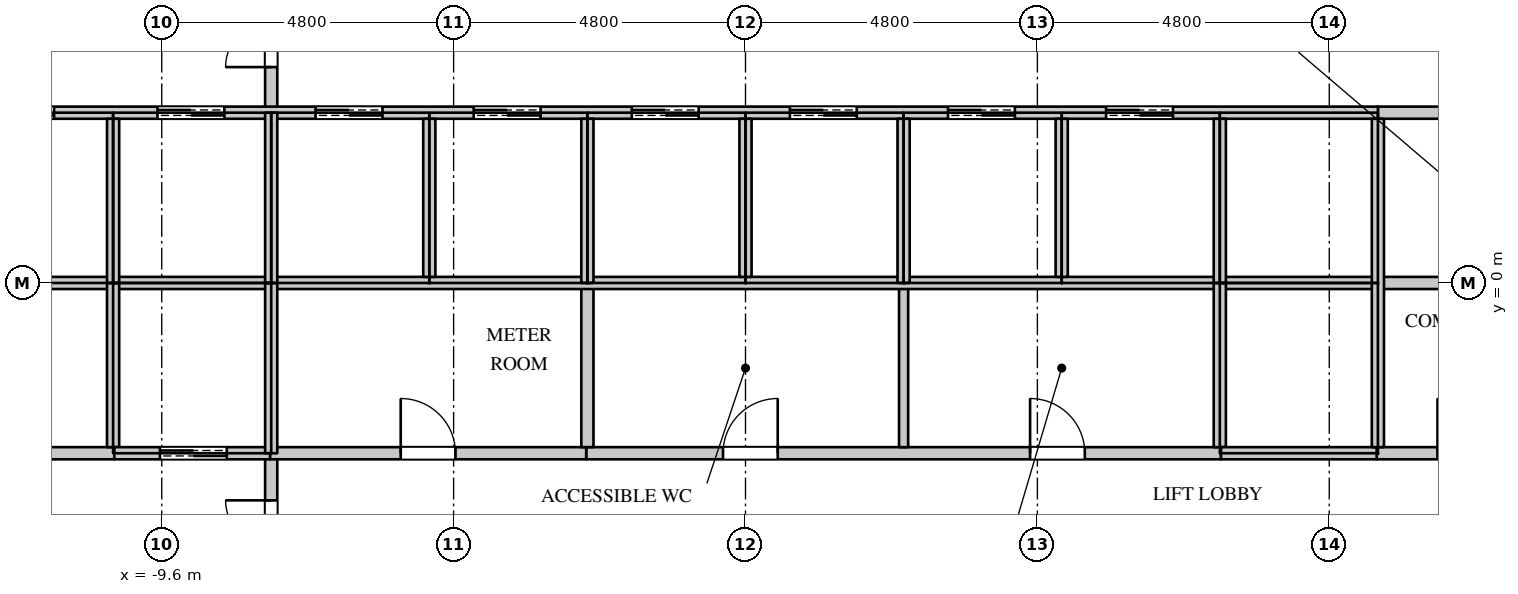
"""IFC4 building model, lengths in metres.
Left out: names, types, materials, properties, quantities, classifications, styles, units other than length and angle.
Written with IfcOpenShell. Run it as: python <this file> out.ifc"""

import sys

from ifc_helpers import new_model, si_unit, direction, frame, frame_2d, origin, place, context, subcontext, project, spatial, rectangle, extrude, element, fill, save


model = new_model("IFC4")
c1 = context("Model", 3, precision=1e-05, world=origin(), true_north=direction((0.0, 1.0)))
c2 = subcontext(c1, "Body", "Model", "MODEL_VIEW")
j1 = project(units=[si_unit("LENGTHUNIT", "METRE"), si_unit("PLANEANGLEUNIT", "RADIAN")], contexts=[c1])
p1 = place(None, origin())
s1 = spatial("IfcSite", under=j1, at=p1, CompositionType="ELEMENT")
p2 = place(p1, origin())
s2 = spatial("IfcBuilding", under=s1, at=p2, CompositionType="ELEMENT")
p3 = place(p2, frame((0.0, 0.0, 96.9)))
s3 = spatial("IfcBuildingStorey", under=s2, at=p3, CompositionType="ELEMENT", Elevation=96.9)
p4 = place(p3, frame((-7.8, -8.075, 0.0), z_axis=(0.0, 0.0, 1.0), x_axis=(0.0, 1.0, 0.0)))
e1 = element("IfcWall", 1, at=p4, inside=s3, PredefinedType="PARTITIONING", context=c2, shape_type="SweptSolid", body=[
    extrude(rectangle(XDim=5.275, YDim=0.2, at=frame_2d((2.637, 0.0))), origin(), (0.0, 0.0, 1.0), 3.798),
])
p5 = place(p4, frame((3.0, 0.0, 0.0)))
e2 = element("IfcOpeningElement", 2, at=p5, cuts=e1, PredefinedType="OPENING", context=c2, shape_type="SweptSolid", body=[
    extrude(rectangle(XDim=1.5, YDim=2.4, at=frame_2d((0.75, 1.2))), frame((0.0, 0.11, 0.0), z_axis=(0.0, -1.0, 0.0), x_axis=(1.0, 0.0, 0.0)), (0.0, 0.0, 1.0), 0.22),
])
p6 = place(p3, frame((-7.8, 2.8, 0.0), z_axis=(0.0, 0.0, 1.0), x_axis=(0.0, 1.0, 0.0)))
e3 = element("IfcWall", 3, at=p6, inside=s3, PredefinedType="PARTITIONING", context=c2, shape_type="SweptSolid", body=[
    extrude(rectangle(XDim=5.275, YDim=0.2, at=frame_2d((2.637, 0.0))), origin(), (0.0, 0.0, 1.0), 3.798),
])
p7 = place(p6, frame((0.75, 0.0, 0.0)))
e4 = element("IfcOpeningElement", 4, at=p7, cuts=e3, PredefinedType="OPENING", context=c2, shape_type="SweptSolid", body=[
    extrude(rectangle(XDim=1.5, YDim=2.4, at=frame_2d((0.75, 1.2))), frame((0.0, 0.11, 0.0), z_axis=(0.0, -1.0, 0.0), x_axis=(1.0, 0.0, 0.0)), (0.0, 0.0, 1.0), 0.22),
])
p8 = place(p3, frame((-2.62, -2.8, 0.0), z_axis=(0.0, 0.0, 1.0), x_axis=(1.0, 0.0, 0.0)))
e5 = element("IfcWall", 5, at=p8, inside=s3, PredefinedType="PARTITIONING", context=c2, shape_type="SweptSolid", body=[
    extrude(rectangle(XDim=10.44, YDim=0.2, at=frame_2d((5.22, 0.0))), origin(), (0.0, 0.0, 1.0), 3.798),
])
p9 = place(p8, frame((2.25, 0.0, 0.0)))
e6 = element("IfcOpeningElement", 6, at=p9, cuts=e5, PredefinedType="OPENING", context=c2, shape_type="SweptSolid", body=[
    extrude(rectangle(XDim=0.9, YDim=2.2, at=frame_2d((0.45, 1.1))), frame((0.0, 0.11, 0.0), z_axis=(0.0, -1.0, 0.0), x_axis=(1.0, 0.0, 0.0)), (0.0, 0.0, 1.0), 0.22),
])
p10 = place(p8, frame((7.3, 0.0, 0.0)))
e7 = element("IfcOpeningElement", 7, at=p10, cuts=e5, PredefinedType="OPENING", context=c2, shape_type="SweptSolid", body=[
    extrude(rectangle(XDim=0.9, YDim=2.2, at=frame_2d((0.45, 1.1))), frame((0.0, 0.11, 0.0), z_axis=(0.0, -1.0, 0.0), x_axis=(1.0, 0.0, 0.0)), (0.0, 0.0, 1.0), 0.22),
])
p11 = place(p3, frame((2.6, -2.7, 0.0), z_axis=(0.0, 0.0, 1.0), x_axis=(0.0, 1.0, 0.0)))
e8 = element("IfcWall", 8, at=p11, inside=s3, PredefinedType="PARTITIONING", context=c2, shape_type="SweptSolid", body=[
    extrude(rectangle(XDim=2.7, YDim=0.15, at=frame_2d((1.35, 0.0))), origin(), (0.0, 0.0, 1.0), 3.798),
])
p12 = place(p3, frame((-13.37, -2.8, 0.0), z_axis=(0.0, 0.0, 1.0), x_axis=(1.0, 0.0, 0.0)))
e9 = element("IfcWall", 9, at=p12, inside=s3, PredefinedType="PARTITIONING", context=c2, shape_type="SweptSolid", body=[
    extrude(rectangle(XDim=2.99, YDim=0.2, at=frame_2d((1.495, 0.0))), origin(), (0.0, 0.0, 1.0), 3.798),
])
p13 = place(p12, frame((1.2, 0.0, 0.0)))
e10 = element("IfcOpeningElement", 10, at=p13, cuts=e9, PredefinedType="OPENING", context=c2, shape_type="SweptSolid", body=[
    extrude(rectangle(XDim=0.6, YDim=2.0, at=frame_2d((0.3, 1.0))), frame((0.0, 0.11, 0.0), z_axis=(0.0, -1.0, 0.0), x_axis=(1.0, 0.0, 0.0)), (0.0, 0.0, 1.0), 0.22),
])
p14 = place(p3, frame((-7.82, -2.8, 0.0), z_axis=(0.0, 0.0, 1.0), x_axis=(1.0, 0.0, 0.0)))
e11 = element("IfcWall", 11, at=p14, inside=s3, PredefinedType="PARTITIONING", context=c2, shape_type="SweptSolid", body=[
    extrude(rectangle(XDim=5.2, YDim=0.2, at=frame_2d((2.6, 0.0))), origin(), (0.0, 0.0, 1.0), 3.798),
])
p15 = place(p14, frame((2.15, 0.0, 0.0)))
e12 = element("IfcOpeningElement", 12, at=p15, cuts=e11, PredefinedType="OPENING", context=c2, shape_type="SweptSolid", body=[
    extrude(rectangle(XDim=0.9, YDim=2.2, at=frame_2d((0.45, 1.1))), frame((0.0, 0.11, 0.0), z_axis=(0.0, -1.0, 0.0), x_axis=(1.0, 0.0, 0.0)), (0.0, 0.0, 1.0), 0.22),
])
p16 = place(p3, frame((-2.6, -2.7, 0.0), z_axis=(0.0, 0.0, 1.0), x_axis=(0.0, 1.0, 0.0)))
e13 = element("IfcWall", 13, at=p16, inside=s3, PredefinedType="PARTITIONING", context=c2, shape_type="SweptSolid", body=[
    extrude(rectangle(XDim=2.7, YDim=0.2, at=frame_2d((1.35, 0.0))), origin(), (0.0, 0.0, 1.0), 3.798),
])
p17 = place(p3, frame((10.38, -2.8, 0.0), z_axis=(0.0, 0.0, 1.0), x_axis=(1.0, 0.0, 0.0)))
e14 = element("IfcWall", 14, at=p17, inside=s3, PredefinedType="PARTITIONING", context=c2, shape_type="SweptSolid", body=[
    extrude(rectangle(XDim=2.99, YDim=0.2, at=frame_2d((1.495, 0.0))), origin(), (0.0, 0.0, 1.0), 3.798),
])
p18 = place(p17, frame((1.0, 0.0, 0.0)))
e15 = element("IfcOpeningElement", 15, at=p18, cuts=e14, PredefinedType="OPENING", context=c2, shape_type="SweptSolid", body=[
    extrude(rectangle(XDim=0.9, YDim=2.2, at=frame_2d((0.45, 1.1))), frame((0.0, 0.11, 0.0), z_axis=(0.0, -1.0, 0.0), x_axis=(1.0, 0.0, 0.0)), (0.0, 0.0, 1.0), 0.22),
])
p19 = place(p3, frame((10.4, 2.8, 0.0), z_axis=(0.0, 0.0, 1.0), x_axis=(1.0, 0.0, 0.0)))
e16 = element("IfcWall", 16, at=p19, inside=s3, PredefinedType="PARTITIONING", context=c2, shape_type="SweptSolid", body=[
    extrude(rectangle(XDim=2.97, YDim=0.2, at=frame_2d((1.485, 0.0))), origin(), (0.0, 0.0, 1.0), 3.798),
])
p20 = place(p19, frame((1.2, 0.0, 0.0)))
e17 = element("IfcOpeningElement", 17, at=p20, cuts=e16, PredefinedType="OPENING", context=c2, shape_type="SweptSolid", body=[
    extrude(rectangle(XDim=0.6, YDim=2.0, at=frame_2d((0.3, 1.0))), frame((0.0, 0.11, 0.0), z_axis=(0.0, -1.0, 0.0), x_axis=(1.0, 0.0, 0.0)), (0.0, 0.0, 1.0), 0.22),
])
p21 = place(p3, frame((10.4, 0.0, 0.0), z_axis=(0.0, 0.0, 1.0), x_axis=(1.0, 0.0, 0.0)))
e18 = element("IfcWall", 18, at=p21, inside=s3, PredefinedType="PARTITIONING", context=c2, shape_type="SweptSolid", body=[
    extrude(rectangle(XDim=2.97, YDim=0.2, at=frame_2d((1.485, 0.0))), origin(), (0.0, 0.0, 1.0), 3.798),
])
p22 = place(p3, frame((-13.37, 0.0, 0.0), z_axis=(0.0, 0.0, 1.0), x_axis=(1.0, 0.0, 0.0)))
e19 = element("IfcWall", 19, at=p22, inside=s3, PredefinedType="PARTITIONING", context=c2, shape_type="SweptSolid", body=[
    extrude(rectangle(XDim=23.77, YDim=0.2, at=frame_2d((11.885, 0.0))), origin(), (0.0, 0.0, 1.0), 3.798),
])
p23 = place(p3, frame((-13.37, 2.8, 0.0), z_axis=(0.0, 0.0, 1.0), x_axis=(1.0, 0.0, 0.0)))
e20 = element("IfcWall", 20, at=p23, inside=s3, PredefinedType="PARTITIONING", context=c2, shape_type="SweptSolid", body=[
    extrude(rectangle(XDim=23.77, YDim=0.2, at=frame_2d((11.885, 0.0))), origin(), (0.0, 0.0, 1.0), 3.798),
])
p24 = place(p23, frame((0.9, 0.0, 0.0)))
e21 = element("IfcOpeningElement", 21, at=p24, cuts=e20, PredefinedType="OPENING", context=c2, shape_type="SweptSolid", body=[
    extrude(rectangle(XDim=1.1, YDim=2.2, at=frame_2d((0.55, 1.1))), frame((0.0, 0.11, 0.0), z_axis=(0.0, -1.0, 0.0), x_axis=(1.0, 0.0, 0.0)), (0.0, 0.0, 1.0), 0.22),
])
p25 = place(p23, frame((3.7, 0.0, 0.0)))
e22 = element("IfcOpeningElement", 22, at=p25, cuts=e20, PredefinedType="OPENING", context=c2, shape_type="SweptSolid", body=[
    extrude(rectangle(XDim=1.1, YDim=2.2, at=frame_2d((0.55, 1.1))), frame((0.0, 0.11, 0.0), z_axis=(0.0, -1.0, 0.0), x_axis=(1.0, 0.0, 0.0)), (0.0, 0.0, 1.0), 0.22),
])
p26 = place(p23, frame((6.3, 0.0, 0.0)))
e23 = element("IfcOpeningElement", 23, at=p26, cuts=e20, PredefinedType="OPENING", context=c2, shape_type="SweptSolid", body=[
    extrude(rectangle(XDim=1.1, YDim=2.2, at=frame_2d((0.55, 1.1))), frame((0.0, 0.11, 0.0), z_axis=(0.0, -1.0, 0.0), x_axis=(1.0, 0.0, 0.0)), (0.0, 0.0, 1.0), 0.22),
])
p27 = place(p23, frame((8.9, 0.0, 0.0)))
e24 = element("IfcOpeningElement", 24, at=p27, cuts=e20, PredefinedType="OPENING", context=c2, shape_type="SweptSolid", body=[
    extrude(rectangle(XDim=1.1, YDim=2.2, at=frame_2d((0.55, 1.1))), frame((0.0, 0.11, 0.0), z_axis=(0.0, -1.0, 0.0), x_axis=(1.0, 0.0, 0.0)), (0.0, 0.0, 1.0), 0.22),
])
p28 = place(p23, frame((11.5, 0.0, 0.0)))
e25 = element("IfcOpeningElement", 25, at=p28, cuts=e20, PredefinedType="OPENING", context=c2, shape_type="SweptSolid", body=[
    extrude(rectangle(XDim=1.1, YDim=2.2, at=frame_2d((0.55, 1.1))), frame((0.0, 0.11, 0.0), z_axis=(0.0, -1.0, 0.0), x_axis=(1.0, 0.0, 0.0)), (0.0, 0.0, 1.0), 0.22),
])
p29 = place(p23, frame((14.1, 0.0, 0.0)))
e26 = element("IfcOpeningElement", 26, at=p29, cuts=e20, PredefinedType="OPENING", context=c2, shape_type="SweptSolid", body=[
    extrude(rectangle(XDim=1.1, YDim=2.2, at=frame_2d((0.55, 1.1))), frame((0.0, 0.11, 0.0), z_axis=(0.0, -1.0, 0.0), x_axis=(1.0, 0.0, 0.0)), (0.0, 0.0, 1.0), 0.22),
])
p30 = place(p23, frame((16.7, 0.0, 0.0)))
e27 = element("IfcOpeningElement", 27, at=p30, cuts=e20, PredefinedType="OPENING", context=c2, shape_type="SweptSolid", body=[
    extrude(rectangle(XDim=1.1, YDim=2.2, at=frame_2d((0.55, 1.1))), frame((0.0, 0.11, 0.0), z_axis=(0.0, -1.0, 0.0), x_axis=(1.0, 0.0, 0.0)), (0.0, 0.0, 1.0), 0.22),
])
p31 = place(p23, frame((19.3, 0.0, 0.0)))
e28 = element("IfcOpeningElement", 28, at=p31, cuts=e20, PredefinedType="OPENING", context=c2, shape_type="SweptSolid", body=[
    extrude(rectangle(XDim=1.1, YDim=2.2, at=frame_2d((0.55, 1.1))), frame((0.0, 0.11, 0.0), z_axis=(0.0, -1.0, 0.0), x_axis=(1.0, 0.0, 0.0)), (0.0, 0.0, 1.0), 0.22),
])
p32 = place(p3, frame((-10.4, -2.7, 0.0), z_axis=(0.0, 0.0, 1.0), x_axis=(0.0, 1.0, 0.0)))
e29 = element("IfcWall", 29, at=p32, inside=s3, PredefinedType="PARTITIONING", context=c2, shape_type="SweptSolid", body=[
    extrude(rectangle(XDim=2.7, YDim=0.2, at=frame_2d((1.35, 0.0))), origin(), (0.0, 0.0, 1.0), 3.798),
])
p33 = place(p3, frame((-10.38, -2.8, 0.0), z_axis=(0.0, 0.0, 1.0), x_axis=(1.0, 0.0, 0.0)))
e30 = element("IfcWall", 30, at=p33, inside=s3, PredefinedType="PARTITIONING", context=c2, shape_type="SweptSolid", body=[
    extrude(rectangle(XDim=2.56, YDim=0.2, at=frame_2d((1.28, 0.0))), origin(), (0.0, 0.0, 1.0), 3.798),
])
p34 = place(p33, frame((0.75, 0.0, 0.0)))
e31 = element("IfcOpeningElement", 31, at=p34, cuts=e30, PredefinedType="OPENING", context=c2, shape_type="SweptSolid", body=[
    extrude(rectangle(XDim=1.1, YDim=2.2, at=frame_2d((0.55, 1.1))), frame((0.0, 0.11, 0.0), z_axis=(0.0, -1.0, 0.0), x_axis=(1.0, 0.0, 0.0)), (0.0, 0.0, 1.0), 0.22),
])
p35 = place(p3, frame((-10.4, 0.0, 0.0), z_axis=(0.0, 0.0, 1.0), x_axis=(0.0, 1.0, 0.0)))
e32 = element("IfcWall", 32, at=p35, inside=s3, PredefinedType="PARTITIONING", context=c2, shape_type="SweptSolid", body=[
    extrude(rectangle(XDim=2.7, YDim=0.2, at=frame_2d((1.35, 0.0))), origin(), (0.0, 0.0, 1.0), 3.798),
])
for number, where, z_axis, x_axis in (
    (33, (-7.8, -2.8, 0.0), (0.0, 0.0, 1.0), (0.0, 1.0, 0.0)),
    (34, (-7.8, 0.0, 0.0), (0.0, 0.0, 1.0), (0.0, 1.0, 0.0)),
):
    element("IfcWall", number, at=place(p3, frame(where, z_axis=z_axis, x_axis=x_axis)), inside=s3, PredefinedType="PARTITIONING", context=c2, shape_type="SweptSolid", body=[
        extrude(rectangle(XDim=2.8, YDim=0.2, at=frame_2d((1.4, 0.0))), origin(), (0.0, 0.0, 1.0), 3.798),
    ])
p36 = place(p3, frame((-5.2, 0.1, 0.0), z_axis=(0.0, 0.0, 1.0), x_axis=(0.0, 1.0, 0.0)))
e35 = element("IfcWall", 35, at=p36, inside=s3, PredefinedType="PARTITIONING", context=c2, shape_type="SweptSolid", body=[
    extrude(rectangle(XDim=2.6, YDim=0.2, at=frame_2d((1.3, 0.0))), origin(), (0.0, 0.0, 1.0), 3.798),
])
p37 = place(p3, frame((-2.6, 0.0, 0.0), z_axis=(0.0, 0.0, 1.0), x_axis=(0.0, 1.0, 0.0)))
e36 = element("IfcWall", 36, at=p37, inside=s3, PredefinedType="PARTITIONING", context=c2, shape_type="SweptSolid", body=[
    extrude(rectangle(XDim=2.7, YDim=0.2, at=frame_2d((1.35, 0.0))), origin(), (0.0, 0.0, 1.0), 3.798),
])
p38 = place(p3, frame((0.0, 0.1, 0.0), z_axis=(0.0, 0.0, 1.0), x_axis=(0.0, 1.0, 0.0)))
e37 = element("IfcWall", 37, at=p38, inside=s3, PredefinedType="PARTITIONING", context=c2, shape_type="SweptSolid", body=[
    extrude(rectangle(XDim=2.6, YDim=0.2, at=frame_2d((1.3, 0.0))), origin(), (0.0, 0.0, 1.0), 3.798),
])
p39 = place(p3, frame((2.6, 0.0, 0.0), z_axis=(0.0, 0.0, 1.0), x_axis=(0.0, 1.0, 0.0)))
e38 = element("IfcWall", 38, at=p39, inside=s3, PredefinedType="PARTITIONING", context=c2, shape_type="SweptSolid", body=[
    extrude(rectangle(XDim=2.7, YDim=0.2, at=frame_2d((1.35, 0.0))), origin(), (0.0, 0.0, 1.0), 3.798),
])
p40 = place(p3, frame((5.2, 0.1, 0.0), z_axis=(0.0, 0.0, 1.0), x_axis=(0.0, 1.0, 0.0)))
e39 = element("IfcWall", 39, at=p40, inside=s3, PredefinedType="PARTITIONING", context=c2, shape_type="SweptSolid", body=[
    extrude(rectangle(XDim=2.6, YDim=0.2, at=frame_2d((1.3, 0.0))), origin(), (0.0, 0.0, 1.0), 3.798),
])
p41 = place(p3, frame((7.8, -2.7, 0.0), z_axis=(0.0, 0.0, 1.0), x_axis=(0.0, 1.0, 0.0)))
e40 = element("IfcWall", 40, at=p41, inside=s3, PredefinedType="PARTITIONING", context=c2, shape_type="SweptSolid", body=[
    extrude(rectangle(XDim=2.7, YDim=0.2, at=frame_2d((1.35, 0.0))), origin(), (0.0, 0.0, 1.0), 3.798),
])
p42 = place(p3, frame((7.82, -2.8, 0.0), z_axis=(0.0, 0.0, 1.0), x_axis=(1.0, 0.0, 0.0)))
e41 = element("IfcWall", 41, at=p42, inside=s3, PredefinedType="PARTITIONING", context=c2, shape_type="SweptSolid", body=[
    extrude(rectangle(XDim=2.56, YDim=0.2, at=frame_2d((1.28, 0.0))), origin(), (0.0, 0.0, 1.0), 3.798),
])
p43 = place(p3, frame((7.8, 0.0, 0.0), z_axis=(0.0, 0.0, 1.0), x_axis=(0.0, 1.0, 0.0)))
e42 = element("IfcWall", 42, at=p43, inside=s3, PredefinedType="PARTITIONING", context=c2, shape_type="SweptSolid", body=[
    extrude(rectangle(XDim=2.7, YDim=0.2, at=frame_2d((1.35, 0.0))), origin(), (0.0, 0.0, 1.0), 3.798),
])
p44 = place(p3, frame((10.4, -2.7, 0.0), z_axis=(0.0, 0.0, 1.0), x_axis=(0.0, 1.0, 0.0)))
e43 = element("IfcWall", 43, at=p44, inside=s3, PredefinedType="PARTITIONING", context=c2, shape_type="SweptSolid", body=[
    extrude(rectangle(XDim=5.4, YDim=0.2, at=frame_2d((2.7, 0.0))), origin(), (0.0, 0.0, 1.0), 3.798),
])
p45 = place(p18, origin())
e44 = element("IfcDoor", 44, at=p45, inside=s3, OperationType="SINGLE_SWING_LEFT", PredefinedType="DOOR", context=c2, shape_type="SweptSolid", body=[
    extrude(rectangle(XDim=0.9, YDim=2.2, at=frame_2d((0.45, 1.1))), frame((0.0, 0.025, 0.0), z_axis=(0.0, -1.0, 0.0), x_axis=(1.0, 0.0, 0.0)), (0.0, 0.0, 1.0), 0.05),
])
fill(e15, e44)
p46 = place(p15, origin())
e45 = element("IfcDoor", 45, at=p46, inside=s3, OperationType="SINGLE_SWING_LEFT", PredefinedType="DOOR", context=c2, shape_type="SweptSolid", body=[
    extrude(rectangle(XDim=0.9, YDim=2.2, at=frame_2d((0.45, 1.1))), frame((0.0, 0.025, 0.0), z_axis=(0.0, -1.0, 0.0), x_axis=(1.0, 0.0, 0.0)), (0.0, 0.0, 1.0), 0.05),
])
fill(e12, e45)
p47 = place(p9, origin())
e46 = element("IfcDoor", 46, at=p47, inside=s3, OperationType="SINGLE_SWING_RIGHT", PredefinedType="DOOR", context=c2, shape_type="SweptSolid", body=[
    extrude(rectangle(XDim=0.9, YDim=2.2, at=frame_2d((0.45, 1.1))), frame((0.0, 0.025, 0.0), z_axis=(0.0, -1.0, 0.0), x_axis=(1.0, 0.0, 0.0)), (0.0, 0.0, 1.0), 0.05),
])
fill(e6, e46)
p48 = place(p10, origin())
e47 = element("IfcDoor", 47, at=p48, inside=s3, OperationType="SINGLE_SWING_LEFT", PredefinedType="DOOR", context=c2, shape_type="SweptSolid", body=[
    extrude(rectangle(XDim=0.9, YDim=2.2, at=frame_2d((0.45, 1.1))), frame((0.0, 0.025, 0.0), z_axis=(0.0, -1.0, 0.0), x_axis=(1.0, 0.0, 0.0)), (0.0, 0.0, 1.0), 0.05),
])
fill(e7, e47)
p49 = place(p24, origin())
e48 = element("IfcDoor", 48, at=p49, inside=s3, OperationType="DOUBLE_DOOR_SLIDING", PredefinedType="DOOR", context=c2, shape_type="SweptSolid", body=[
    extrude(rectangle(XDim=1.1, YDim=2.2, at=frame_2d((0.55, 1.1))), frame((0.0, 0.025, 0.0), z_axis=(0.0, -1.0, 0.0), x_axis=(1.0, 0.0, 0.0)), (0.0, 0.0, 1.0), 0.05),
])
fill(e21, e48)
p50 = place(p25, origin())
e49 = element("IfcDoor", 49, at=p50, inside=s3, OperationType="DOUBLE_DOOR_SLIDING", PredefinedType="DOOR", context=c2, shape_type="SweptSolid", body=[
    extrude(rectangle(XDim=1.1, YDim=2.2, at=frame_2d((0.55, 1.1))), frame((0.0, 0.025, 0.0), z_axis=(0.0, -1.0, 0.0), x_axis=(1.0, 0.0, 0.0)), (0.0, 0.0, 1.0), 0.05),
])
fill(e22, e49)
p51 = place(p34, origin())
e50 = element("IfcDoor", 50, at=p51, inside=s3, OperationType="DOUBLE_DOOR_SLIDING", PredefinedType="DOOR", context=c2, shape_type="SweptSolid", body=[
    extrude(rectangle(XDim=1.1, YDim=2.2, at=frame_2d((0.55, 1.1))), frame((0.0, 0.025, 0.0), z_axis=(0.0, -1.0, 0.0), x_axis=(1.0, 0.0, 0.0)), (0.0, 0.0, 1.0), 0.05),
])
fill(e31, e50)
p52 = place(p26, origin())
e51 = element("IfcDoor", 51, at=p52, inside=s3, OperationType="DOUBLE_DOOR_SLIDING", PredefinedType="DOOR", context=c2, shape_type="SweptSolid", body=[
    extrude(rectangle(XDim=1.1, YDim=2.2, at=frame_2d((0.55, 1.1))), frame((0.0, 0.025, 0.0), z_axis=(0.0, -1.0, 0.0), x_axis=(1.0, 0.0, 0.0)), (0.0, 0.0, 1.0), 0.05),
])
fill(e23, e51)
p53 = place(p27, origin())
e52 = element("IfcDoor", 52, at=p53, inside=s3, OperationType="DOUBLE_DOOR_SLIDING", PredefinedType="DOOR", context=c2, shape_type="SweptSolid", body=[
    extrude(rectangle(XDim=1.1, YDim=2.2, at=frame_2d((0.55, 1.1))), frame((0.0, 0.025, 0.0), z_axis=(0.0, -1.0, 0.0), x_axis=(1.0, 0.0, 0.0)), (0.0, 0.0, 1.0), 0.05),
])
fill(e24, e52)
p54 = place(p28, origin())
e53 = element("IfcDoor", 53, at=p54, inside=s3, OperationType="DOUBLE_DOOR_SLIDING", PredefinedType="DOOR", context=c2, shape_type="SweptSolid", body=[
    extrude(rectangle(XDim=1.1, YDim=2.2, at=frame_2d((0.55, 1.1))), frame((0.0, 0.025, 0.0), z_axis=(0.0, -1.0, 0.0), x_axis=(1.0, 0.0, 0.0)), (0.0, 0.0, 1.0), 0.05),
])
fill(e25, e53)
p55 = place(p29, origin())
e54 = element("IfcDoor", 54, at=p55, inside=s3, OperationType="DOUBLE_DOOR_SLIDING", PredefinedType="DOOR", context=c2, shape_type="SweptSolid", body=[
    extrude(rectangle(XDim=1.1, YDim=2.2, at=frame_2d((0.55, 1.1))), frame((0.0, 0.025, 0.0), z_axis=(0.0, -1.0, 0.0), x_axis=(1.0, 0.0, 0.0)), (0.0, 0.0, 1.0), 0.05),
])
fill(e26, e54)
p56 = place(p30, origin())
e55 = element("IfcDoor", 55, at=p56, inside=s3, OperationType="DOUBLE_DOOR_SLIDING", PredefinedType="DOOR", context=c2, shape_type="SweptSolid", body=[
    extrude(rectangle(XDim=1.1, YDim=2.2, at=frame_2d((0.55, 1.1))), frame((0.0, 0.025, 0.0), z_axis=(0.0, -1.0, 0.0), x_axis=(1.0, 0.0, 0.0)), (0.0, 0.0, 1.0), 0.05),
])
fill(e27, e55)
p57 = place(p31, origin())
e56 = element("IfcDoor", 56, at=p57, inside=s3, OperationType="DOUBLE_DOOR_SLIDING", PredefinedType="DOOR", context=c2, shape_type="SweptSolid", body=[
    extrude(rectangle(XDim=1.1, YDim=2.2, at=frame_2d((0.55, 1.1))), frame((0.0, 0.025, 0.0), z_axis=(0.0, -1.0, 0.0), x_axis=(1.0, 0.0, 0.0)), (0.0, 0.0, 1.0), 0.05),
])
fill(e28, e56)
p58 = place(p7, origin())
e57 = element("IfcDoor", 57, at=p58, inside=s3, OperationType="DOUBLE_DOOR_SINGLE_SWING", PredefinedType="DOOR", context=c2, shape_type="SweptSolid", body=[
    extrude(rectangle(XDim=1.5, YDim=2.4, at=frame_2d((0.75, 1.2))), frame((0.0, 0.025, 0.0), z_axis=(0.0, -1.0, 0.0), x_axis=(1.0, 0.0, 0.0)), (0.0, 0.0, 1.0), 0.05),
])
fill(e4, e57)
p59 = place(p5, origin())
e58 = element("IfcDoor", 58, at=p59, inside=s3, OperationType="DOUBLE_DOOR_SINGLE_SWING", PredefinedType="DOOR", context=c2, shape_type="SweptSolid", body=[
    extrude(rectangle(XDim=1.5, YDim=2.4, at=frame_2d((0.75, 1.2))), frame((0.0, 0.025, 0.0), z_axis=(0.0, -1.0, 0.0), x_axis=(1.0, 0.0, 0.0)), (0.0, 0.0, 1.0), 0.05),
])
fill(e2, e58)
save(model, sys.argv[1])
